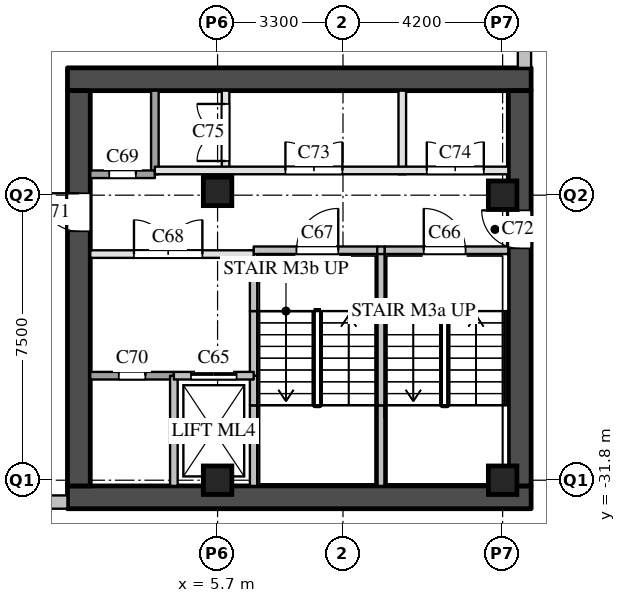
"""IFC4 building model, lengths in metres.
Left out: names, types, materials, properties, quantities, classifications, styles, units other than length and angle.
Written with IfcOpenShell. Run it as: python <this file> out.ifc"""

import sys

from ifc_helpers import new_model, si_unit, direction, frame, frame_2d, origin, origin_2d, place, context, subcontext, project, spatial, rectangle, extrude, element, fill, save


model = new_model("IFC4")
c1 = context("Model", 3, precision=1e-05, world=origin(), true_north=direction((0.0, 1.0)))
c2 = subcontext(c1, "Body", "Model", "MODEL_VIEW")
j1 = project(units=[si_unit("LENGTHUNIT", "METRE"), si_unit("PLANEANGLEUNIT", "RADIAN")], contexts=[c1])
p1 = place(None, origin())
s1 = spatial("IfcSite", under=j1, at=p1, CompositionType="ELEMENT")
p2 = place(p1, origin())
s2 = spatial("IfcBuilding", under=s1, at=p2, CompositionType="ELEMENT")
p3 = place(p2, frame((0.0, 0.0, -6.0)))
s3 = spatial("IfcBuildingStorey", under=s2, at=p3, CompositionType="ELEMENT", Elevation=-6.0)
p4 = place(p3, frame((13.775, -1.4, 0.0), z_axis=(0.0, 0.0, 1.0), x_axis=(0.0, -1.0, 0.0)))
e1 = element("IfcWall", 1, at=p4, inside=s3, PredefinedType="SOLIDWALL", context=c2, shape_type="SweptSolid", body=[
    extrude(rectangle(XDim=19.55, YDim=0.35, at=frame_2d((9.775, 0.0))), origin(), (0.0, 0.0, 1.0), 5.59),
])
p5 = place(p3, frame((1.75, -32.375, 0.0), z_axis=(0.0, 0.0, 1.0), x_axis=(-1.0, 0.0, 0.0)))
e2 = element("IfcWall", 2, at=p5, inside=s3, PredefinedType="SOLIDWALL", context=c2, shape_type="SweptSolid", body=[
    extrude(rectangle(XDim=22.1, YDim=0.35, at=frame_2d((11.05, 0.0))), origin(), (0.0, 0.0, 1.0), 5.59),
])
for number, where, z_axis, x_axis in (
    (3, (5.7, -31.8, 0.0), (0.0, 0.0, 1.0), (1.0, 0.0, 0.0)),
    (4, (5.7, -24.2, 0.0), (0.0, 0.0, 1.0), (1.0, 0.0, 0.0)),
    (5, (13.2, -31.8, 0.0), (0.0, 0.0, 1.0), (1.0, 0.0, 0.0)),
    (6, (13.2, -24.3, 0.0), (0.0, 0.0, 1.0), (1.0, 0.0, 0.0)),
):
    element("IfcColumn", number, at=place(p3, frame(where, z_axis=z_axis, x_axis=x_axis)), inside=s3, PredefinedType="COLUMN", context=c2, shape_type="SweptSolid", body=[
        extrude(rectangle(XDim=0.75, YDim=0.75, at=origin_2d()), origin(), (0.0, 0.0, 1.0), 6.0),
    ])
for number, where, z_axis, x_axis in (
    (7, (1.75, -32.25, 0.0), (0.0, 0.0, 1.0), (1.0, 0.0, 0.0)),
    (8, (1.75, -21.25, 0.0), (0.0, 0.0, 1.0), (1.0, 0.0, 0.0)),
):
    element("IfcWall", number, at=place(p3, frame(where, z_axis=z_axis, x_axis=x_axis)), inside=s3, PredefinedType="SHEAR", context=c2, shape_type="SweptSolid", body=[
        extrude(rectangle(XDim=12.2, YDim=0.6, at=frame_2d((6.1, 0.0))), origin(), (0.0, 0.0, 1.0), 5.59),
    ])
p6 = place(p3, frame((2.05, -31.95, 0.0), z_axis=(0.0, 0.0, 1.0), x_axis=(0.0, 1.0, 0.0)))
e9 = element("IfcWall", 9, at=p6, inside=s3, PredefinedType="SHEAR", context=c2, shape_type="SweptSolid", body=[
    extrude(rectangle(XDim=10.4, YDim=0.6, at=frame_2d((5.2, 0.0))), origin(), (0.0, 0.0, 1.0), 5.59),
])
p7 = place(p6, frame((6.7, 0.0, 0.0)))
e10 = element("IfcOpeningElement", 10, at=p7, cuts=e9, PredefinedType="OPENING", context=c2, shape_type="SweptSolid", body=[
    extrude(rectangle(XDim=1.0, YDim=2.1, at=frame_2d((0.5, 1.05))), frame((0.0, 0.31, 0.0), z_axis=(0.0, -1.0, 0.0), x_axis=(1.0, 0.0, 0.0)), (0.0, 0.0, 1.0), 0.62),
])
p8 = place(p3, frame((13.65, -31.95, 0.0), z_axis=(0.0, 0.0, 1.0), x_axis=(0.0, 1.0, 0.0)))
e11 = element("IfcWall", 11, at=p8, inside=s3, PredefinedType="SHEAR", context=c2, shape_type="SweptSolid", body=[
    extrude(rectangle(XDim=10.4, YDim=0.6, at=frame_2d((5.2, 0.0))), origin(), (0.0, 0.0, 1.0), 5.59),
])
p9 = place(p8, frame((6.25, 0.0, 0.0)))
e12 = element("IfcOpeningElement", 12, at=p9, cuts=e11, PredefinedType="OPENING", context=c2, shape_type="SweptSolid", body=[
    extrude(rectangle(XDim=1.0, YDim=2.1, at=frame_2d((0.5, 1.05))), frame((0.0, 0.31, 0.0), z_axis=(0.0, -1.0, 0.0), x_axis=(1.0, 0.0, 0.0)), (0.0, 0.0, 1.0), 0.62),
])
p10 = place(p3, frame((4.05, -23.75, 0.0), z_axis=(0.0, 0.0, 1.0), x_axis=(0.0, 1.0, 0.0)))
e13 = element("IfcWall", 13, at=p10, inside=s3, PredefinedType="SOLIDWALL", context=c2, shape_type="SweptSolid", body=[
    extrude(rectangle(XDim=2.2, YDim=0.2, at=frame_2d((1.1, 0.0))), origin(), (0.0, 0.0, 1.0), 5.59),
])
p11 = place(p3, frame((4.55, -31.95, 0.0), z_axis=(0.0, 0.0, 1.0), x_axis=(0.0, 1.0, 0.0)))
e14 = element("IfcWall", 14, at=p11, inside=s3, PredefinedType="SOLIDWALL", context=c2, shape_type="SweptSolid", body=[
    extrude(rectangle(XDim=2.9, YDim=0.2, at=frame_2d((1.45, 0.0))), origin(), (0.0, 0.0, 1.0), 5.59),
])
p12 = place(p3, frame((5.91, -23.75, 0.0), z_axis=(0.0, 0.0, 1.0), x_axis=(0.0, 1.0, 0.0)))
e15 = element("IfcWall", 15, at=p12, inside=s3, PredefinedType="PARTITIONING", context=c2, shape_type="SweptSolid", body=[
    extrude(rectangle(XDim=2.2, YDim=0.2, at=frame_2d((1.1, 0.0))), origin(), (0.0, 0.0, 1.0), 5.59),
])
p13 = place(p12, frame((0.35, 0.0, 0.0)))
e16 = element("IfcOpeningElement", 16, at=p13, cuts=e15, PredefinedType="OPENING", context=c2, shape_type="SweptSolid", body=[
    extrude(rectangle(XDim=1.5, YDim=2.1, at=frame_2d((0.75, 1.05))), frame((0.0, 0.11, 0.0), z_axis=(0.0, -1.0, 0.0), x_axis=(1.0, 0.0, 0.0)), (0.0, 0.0, 1.0), 0.22),
])
p14 = place(p3, frame((6.65, -31.95, 0.0), z_axis=(0.0, 0.0, 1.0), x_axis=(0.0, 1.0, 0.0)))
e17 = element("IfcWall", 17, at=p14, inside=s3, PredefinedType="SOLIDWALL", context=c2, shape_type="SweptSolid", body=[
    extrude(rectangle(XDim=2.12, YDim=0.2, at=frame_2d((1.06, 0.0))), origin(), (0.0, 0.0, 1.0), 5.59),
])
p15 = place(p3, frame((6.65, -29.83, 0.0), z_axis=(0.0, 0.0, 1.0), x_axis=(0.0, 1.0, 0.0)))
e18 = element("IfcWall", 18, at=p15, inside=s3, PredefinedType="SOLIDWALL", context=c2, shape_type="SweptSolid", body=[
    extrude(rectangle(XDim=0.78, YDim=0.2, at=frame_2d((0.39, 0.0))), origin(), (0.0, 0.0, 1.0), 5.59),
])
p16 = place(p3, frame((6.65, -29.05, 0.0), z_axis=(0.0, 0.0, 1.0), x_axis=(0.0, 1.0, 0.0)))
e19 = element("IfcWall", 19, at=p16, inside=s3, PredefinedType="SOLIDWALL", context=c2, shape_type="SweptSolid", body=[
    extrude(rectangle(XDim=1.7, YDim=0.2, at=frame_2d((0.85, 0.0))), origin(), (0.0, 0.0, 1.0), 5.59),
])
p17 = place(p3, frame((6.65, -27.35, 0.0), z_axis=(0.0, 0.0, 1.0), x_axis=(0.0, 1.0, 0.0)))
e20 = element("IfcWall", 20, at=p17, inside=s3, PredefinedType="SOLIDWALL", context=c2, shape_type="SweptSolid", body=[
    extrude(rectangle(XDim=1.6, YDim=0.2, at=frame_2d((0.8, 0.0))), origin(), (0.0, 0.0, 1.0), 5.59),
])
p18 = place(p3, frame((10.0, -31.95, 0.0), z_axis=(0.0, 0.0, 1.0), x_axis=(0.0, 1.0, 0.0)))
e21 = element("IfcWall", 21, at=p18, inside=s3, PredefinedType="SOLIDWALL", context=c2, shape_type="SweptSolid", body=[
    extrude(rectangle(XDim=2.12, YDim=0.2, at=frame_2d((1.06, 0.0))), origin(), (0.0, 0.0, 1.0), 5.59),
])
p19 = place(p3, frame((10.0, -29.83, 0.0), z_axis=(0.0, 0.0, 1.0), x_axis=(0.0, 1.0, 0.0)))
e22 = element("IfcWall", 22, at=p19, inside=s3, PredefinedType="SOLIDWALL", context=c2, shape_type="SweptSolid", body=[
    extrude(rectangle(XDim=2.48, YDim=0.2, at=frame_2d((1.24, 0.0))), origin(), (0.0, 0.0, 1.0), 5.59),
])
p20 = place(p3, frame((10.0, -27.35, 0.0), z_axis=(0.0, 0.0, 1.0), x_axis=(0.0, 1.0, 0.0)))
e23 = element("IfcWall", 23, at=p20, inside=s3, PredefinedType="SOLIDWALL", context=c2, shape_type="SweptSolid", body=[
    extrude(rectangle(XDim=1.6, YDim=0.2, at=frame_2d((0.8, 0.0))), origin(), (0.0, 0.0, 1.0), 5.59),
])
p21 = place(p3, frame((10.56, -23.75, 0.0), z_axis=(0.0, 0.0, 1.0), x_axis=(0.0, 1.0, 0.0)))
e24 = element("IfcWall", 24, at=p21, inside=s3, PredefinedType="PARTITIONING", context=c2, shape_type="SweptSolid", body=[
    extrude(rectangle(XDim=2.2, YDim=0.2, at=frame_2d((1.1, 0.0))), origin(), (0.0, 0.0, 1.0), 5.59),
])
p22 = place(p3, frame((4.55, -29.05, 0.0), z_axis=(0.0, 0.0, 1.0), x_axis=(1.0, 0.0, 0.0)))
e25 = element("IfcWall", 25, at=p22, inside=s3, PredefinedType="SOLIDWALL", context=c2, shape_type="SweptSolid", body=[
    extrude(rectangle(XDim=2.1, YDim=0.2, at=frame_2d((1.05, 0.0))), origin(), (0.0, 0.0, 1.0), 5.59),
])
p23 = place(p22, frame((0.45, 0.0, 0.0)))
e26 = element("IfcOpeningElement", 26, at=p23, cuts=e25, PredefinedType="OPENING", context=c2, shape_type="SweptSolid", body=[
    extrude(rectangle(XDim=1.2, YDim=2.1, at=frame_2d((0.6, 1.05))), frame((0.0, 0.11, 0.0), z_axis=(0.0, -1.0, 0.0), x_axis=(1.0, 0.0, 0.0)), (0.0, 0.0, 1.0), 0.22),
])
p24 = place(p3, frame((2.35, -29.05, 0.0), z_axis=(0.0, 0.0, 1.0), x_axis=(1.0, 0.0, 0.0)))
e27 = element("IfcWall", 27, at=p24, inside=s3, PredefinedType="SOLIDWALL", context=c2, shape_type="SweptSolid", body=[
    extrude(rectangle(XDim=2.2, YDim=0.2, at=frame_2d((1.1, 0.0))), origin(), (0.0, 0.0, 1.0), 5.59),
])
p25 = place(p24, frame((0.75, 0.0, 0.0)))
e28 = element("IfcOpeningElement", 28, at=p25, cuts=e27, PredefinedType="OPENING", context=c2, shape_type="SweptSolid", body=[
    extrude(rectangle(XDim=0.7, YDim=2.1, at=frame_2d((0.35, 1.05))), frame((0.0, 0.11, 0.0), z_axis=(0.0, -1.0, 0.0), x_axis=(1.0, 0.0, 0.0)), (0.0, 0.0, 1.0), 0.22),
])
p26 = place(p3, frame((2.35, -25.85, 0.0), z_axis=(0.0, 0.0, 1.0), x_axis=(1.0, 0.0, 0.0)))
e29 = element("IfcWall", 29, at=p26, inside=s3, PredefinedType="PARTITIONING", context=c2, shape_type="SweptSolid", body=[
    extrude(rectangle(XDim=4.3, YDim=0.2, at=frame_2d((2.15, 0.0))), origin(), (0.0, 0.0, 1.0), 5.59),
])
p27 = place(p26, frame((1.15, 0.0, 0.0)))
e30 = element("IfcOpeningElement", 30, at=p27, cuts=e29, PredefinedType="OPENING", context=c2, shape_type="SweptSolid", body=[
    extrude(rectangle(XDim=1.8, YDim=2.1, at=frame_2d((0.9, 1.05))), frame((0.0, 0.11, 0.0), z_axis=(0.0, -1.0, 0.0), x_axis=(1.0, 0.0, 0.0)), (0.0, 0.0, 1.0), 0.22),
])
p28 = place(p3, frame((6.65, -25.75, 0.0), z_axis=(0.0, 0.0, 1.0), x_axis=(1.0, 0.0, 0.0)))
e31 = element("IfcWall", 31, at=p28, inside=s3, PredefinedType="SOLIDWALL", context=c2, shape_type="SweptSolid", body=[
    extrude(rectangle(XDim=3.25, YDim=0.2, at=frame_2d((1.625, 0.0))), origin(), (0.0, 0.0, 1.0), 5.59),
])
p29 = place(p28, frame((1.125, 0.0, 0.0)))
e32 = element("IfcOpeningElement", 32, at=p29, cuts=e31, PredefinedType="OPENING", context=c2, shape_type="SweptSolid", body=[
    extrude(rectangle(XDim=1.1, YDim=2.1, at=frame_2d((0.55, 1.05))), frame((0.0, 0.11, 0.0), z_axis=(0.0, -1.0, 0.0), x_axis=(1.0, 0.0, 0.0)), (0.0, 0.0, 1.0), 0.22),
])
p30 = place(p3, frame((9.9, -25.75, 0.0), z_axis=(0.0, 0.0, 1.0), x_axis=(1.0, 0.0, 0.0)))
e33 = element("IfcWall", 33, at=p30, inside=s3, PredefinedType="SOLIDWALL", context=c2, shape_type="SweptSolid", body=[
    extrude(rectangle(XDim=0.2, YDim=0.2, at=frame_2d((0.1, 0.0))), origin(), (0.0, 0.0, 1.0), 5.59),
])
p31 = place(p3, frame((10.1, -25.75, 0.0), z_axis=(0.0, 0.0, 1.0), x_axis=(1.0, 0.0, 0.0)))
e34 = element("IfcWall", 34, at=p31, inside=s3, PredefinedType="SOLIDWALL", context=c2, shape_type="SweptSolid", body=[
    extrude(rectangle(XDim=3.25, YDim=0.2, at=frame_2d((1.625, 0.0))), origin(), (0.0, 0.0, 1.0), 5.59),
])
p32 = place(p31, frame((1.025, 0.0, 0.0)))
e35 = element("IfcOpeningElement", 35, at=p32, cuts=e34, PredefinedType="OPENING", context=c2, shape_type="SweptSolid", body=[
    extrude(rectangle(XDim=1.1, YDim=2.1, at=frame_2d((0.55, 1.05))), frame((0.0, 0.11, 0.0), z_axis=(0.0, -1.0, 0.0), x_axis=(1.0, 0.0, 0.0)), (0.0, 0.0, 1.0), 0.22),
])
p33 = place(p3, frame((4.05, -23.65, 0.0), z_axis=(0.0, 0.0, 1.0), x_axis=(1.0, 0.0, 0.0)))
e36 = element("IfcWall", 36, at=p33, inside=s3, PredefinedType="PARTITIONING", context=c2, shape_type="SweptSolid", body=[
    extrude(rectangle(XDim=9.3, YDim=0.2, at=frame_2d((4.65, 0.0))), origin(), (0.0, 0.0, 1.0), 5.59),
])
p34 = place(p33, frame((3.435, 0.0, 0.0)))
e37 = element("IfcOpeningElement", 37, at=p34, cuts=e36, PredefinedType="OPENING", context=c2, shape_type="SweptSolid", body=[
    extrude(rectangle(XDim=1.5, YDim=2.1, at=frame_2d((0.75, 1.05))), frame((0.0, 0.11, 0.0), z_axis=(0.0, -1.0, 0.0), x_axis=(1.0, 0.0, 0.0)), (0.0, 0.0, 1.0), 0.22),
])
p35 = place(p33, frame((7.155, 0.0, 0.0)))
e38 = element("IfcOpeningElement", 38, at=p35, cuts=e36, PredefinedType="OPENING", context=c2, shape_type="SweptSolid", body=[
    extrude(rectangle(XDim=1.5, YDim=2.1, at=frame_2d((0.75, 1.05))), frame((0.0, 0.11, 0.0), z_axis=(0.0, -1.0, 0.0), x_axis=(1.0, 0.0, 0.0)), (0.0, 0.0, 1.0), 0.22),
])
p36 = place(p3, frame((2.35, -23.75, 0.0), z_axis=(0.0, 0.0, 1.0), x_axis=(1.0, 0.0, 0.0)))
e39 = element("IfcWall", 39, at=p36, inside=s3, PredefinedType="SOLIDWALL", context=c2, shape_type="SweptSolid", body=[
    extrude(rectangle(XDim=1.7, YDim=0.2, at=frame_2d((0.85, 0.0))), origin(), (0.0, 0.0, 1.0), 5.59),
])
p37 = place(p36, frame((0.5, 0.0, 0.0)))
e40 = element("IfcOpeningElement", 40, at=p37, cuts=e39, PredefinedType="OPENING", context=c2, shape_type="SweptSolid", body=[
    extrude(rectangle(XDim=0.7, YDim=2.1, at=frame_2d((0.35, 1.05))), frame((0.0, 0.11, 0.0), z_axis=(0.0, -1.0, 0.0), x_axis=(1.0, 0.0, 0.0)), (0.0, 0.0, 1.0), 0.22),
])
p38 = place(p23, origin())
e41 = element("IfcDoor", 41, at=p38, inside=s3, OperationType="SLIDING_TO_LEFT", PredefinedType="DOOR", context=c2, shape_type="SweptSolid", body=[
    extrude(rectangle(XDim=1.2, YDim=2.1, at=frame_2d((0.6, 1.05))), frame((0.0, 0.025, 0.0), z_axis=(0.0, -1.0, 0.0), x_axis=(1.0, 0.0, 0.0)), (0.0, 0.0, 1.0), 0.05),
])
fill(e26, e41)
p39 = place(p32, origin())
e42 = element("IfcDoor", 42, at=p39, inside=s3, OperationType="SINGLE_SWING_LEFT", PredefinedType="DOOR", context=c2, shape_type="SweptSolid", body=[
    extrude(rectangle(XDim=1.1, YDim=2.1, at=frame_2d((0.55, 1.05))), frame((0.0, 0.025, 0.0), z_axis=(0.0, -1.0, 0.0), x_axis=(1.0, 0.0, 0.0)), (0.0, 0.0, 1.0), 0.05),
])
fill(e35, e42)
p40 = place(p29, origin())
e43 = element("IfcDoor", 43, at=p40, inside=s3, OperationType="SINGLE_SWING_RIGHT", PredefinedType="DOOR", context=c2, shape_type="SweptSolid", body=[
    extrude(rectangle(XDim=1.1, YDim=2.1, at=frame_2d((0.55, 1.05))), frame((0.0, 0.025, 0.0), z_axis=(0.0, -1.0, 0.0), x_axis=(1.0, 0.0, 0.0)), (0.0, 0.0, 1.0), 0.05),
])
fill(e32, e43)
p41 = place(p27, origin())
e44 = element("IfcDoor", 44, at=p41, inside=s3, OperationType="DOUBLE_DOOR_SINGLE_SWING", PredefinedType="DOOR", context=c2, shape_type="SweptSolid", body=[
    extrude(rectangle(XDim=1.8, YDim=2.1, at=frame_2d((0.9, 1.05))), frame((0.0, 0.025, 0.0), z_axis=(0.0, -1.0, 0.0), x_axis=(1.0, 0.0, 0.0)), (0.0, 0.0, 1.0), 0.05),
])
fill(e30, e44)
p42 = place(p37, origin())
e45 = element("IfcDoor", 45, at=p42, inside=s3, OperationType="SINGLE_SWING_RIGHT", PredefinedType="DOOR", context=c2, shape_type="SweptSolid", body=[
    extrude(rectangle(XDim=0.7, YDim=2.1, at=frame_2d((0.35, 1.05))), frame((0.0, 0.025, 0.0), z_axis=(0.0, -1.0, 0.0), x_axis=(1.0, 0.0, 0.0)), (0.0, 0.0, 1.0), 0.05),
])
fill(e40, e45)
p43 = place(p25, origin())
e46 = element("IfcDoor", 46, at=p43, inside=s3, OperationType="SINGLE_SWING_RIGHT", PredefinedType="DOOR", context=c2, shape_type="SweptSolid", body=[
    extrude(rectangle(XDim=0.7, YDim=2.1, at=frame_2d((0.35, 1.05))), frame((0.0, 0.025, 0.0), z_axis=(0.0, -1.0, 0.0), x_axis=(1.0, 0.0, 0.0)), (0.0, 0.0, 1.0), 0.05),
])
fill(e28, e46)
p44 = place(p7, origin())
e47 = element("IfcDoor", 47, at=p44, inside=s3, OperationType="SINGLE_SWING_RIGHT", PredefinedType="DOOR", context=c2, shape_type="SweptSolid", body=[
    extrude(rectangle(XDim=1.0, YDim=2.1, at=frame_2d((0.5, 1.05))), frame((0.0, 0.025, 0.0), z_axis=(0.0, -1.0, 0.0), x_axis=(1.0, 0.0, 0.0)), (0.0, 0.0, 1.0), 0.05),
])
fill(e10, e47)
p45 = place(p9, origin())
e48 = element("IfcDoor", 48, at=p45, inside=s3, OperationType="SINGLE_SWING_RIGHT", PredefinedType="DOOR", context=c2, shape_type="SweptSolid", body=[
    extrude(rectangle(XDim=1.0, YDim=2.1, at=frame_2d((0.5, 1.05))), frame((0.0, 0.025, 0.0), z_axis=(0.0, -1.0, 0.0), x_axis=(1.0, 0.0, 0.0)), (0.0, 0.0, 1.0), 0.05),
])
fill(e12, e48)
p46 = place(p34, origin())
e49 = element("IfcDoor", 49, at=p46, inside=s3, OperationType="DOUBLE_DOOR_SINGLE_SWING", PredefinedType="DOOR", context=c2, shape_type="SweptSolid", body=[
    extrude(rectangle(XDim=1.5, YDim=2.1, at=frame_2d((0.75, 1.05))), frame((0.0, 0.025, 0.0), z_axis=(0.0, -1.0, 0.0), x_axis=(1.0, 0.0, 0.0)), (0.0, 0.0, 1.0), 0.05),
])
fill(e37, e49)
p47 = place(p35, origin())
e50 = element("IfcDoor", 50, at=p47, inside=s3, OperationType="DOUBLE_DOOR_SINGLE_SWING", PredefinedType="DOOR", context=c2, shape_type="SweptSolid", body=[
    extrude(rectangle(XDim=1.5, YDim=2.1, at=frame_2d((0.75, 1.05))), frame((0.0, 0.025, 0.0), z_axis=(0.0, -1.0, 0.0), x_axis=(1.0, 0.0, 0.0)), (0.0, 0.0, 1.0), 0.05),
])
fill(e38, e50)
p48 = place(p13, origin())
e51 = element("IfcDoor", 51, at=p48, inside=s3, OperationType="DOUBLE_DOOR_SINGLE_SWING", PredefinedType="DOOR", context=c2, shape_type="SweptSolid", body=[
    extrude(rectangle(XDim=1.5, YDim=2.1, at=frame_2d((0.75, 1.05))), frame((0.0, 0.025, 0.0), z_axis=(0.0, -1.0, 0.0), x_axis=(1.0, 0.0, 0.0)), (0.0, 0.0, 1.0), 0.05),
])
fill(e16, e51)
save(model, sys.argv[1])
